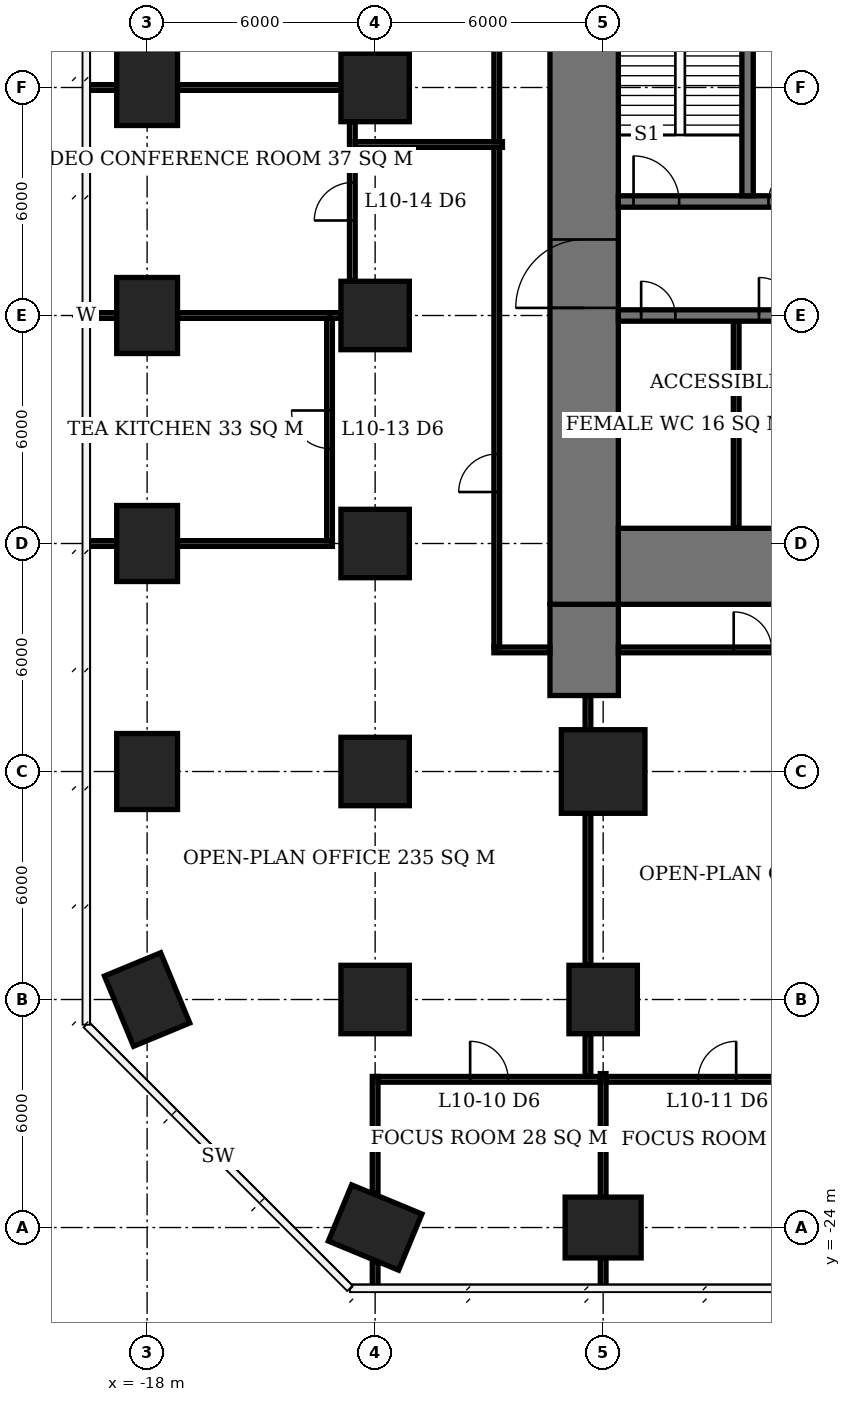
"""IFC4 building model, lengths in metres.
Left out: names, types, materials, properties, quantities, classifications, styles, units other than length and angle.
Written with IfcOpenShell. Run it as: python <this file> out.ifc"""

import sys

from ifc_helpers import new_model, si_unit, direction, frame, frame_2d, origin, origin_2d, place, context, subcontext, project, spatial, rectangle, extrude, element, fill, save


model = new_model("IFC4")
c1 = context("Model", 3, precision=1e-05, world=origin(), true_north=direction((0.0, 1.0)))
c2 = subcontext(c1, "Body", "Model", "MODEL_VIEW")
j1 = project(units=[si_unit("LENGTHUNIT", "METRE"), si_unit("PLANEANGLEUNIT", "RADIAN")], contexts=[c1])
p1 = place(None, origin())
s1 = spatial("IfcSite", under=j1, at=p1, CompositionType="ELEMENT")
p2 = place(p1, origin())
s2 = spatial("IfcBuilding", under=s1, at=p2, CompositionType="ELEMENT")
p3 = place(p2, frame((0.0, 0.0, 45.5)))
s3 = spatial("IfcBuildingStorey", under=s2, at=p3, CompositionType="ELEMENT", Elevation=45.5)
for number, where, z_axis, x_axis in (
    (1, (-18.0, -18.0, 0.0), (0.0, 0.0, 1.0), (-0.383, 0.924, 0.0)),
    (2, (-18.0, -12.0, 0.0), (0.0, 0.0, 1.0), (0.0, 1.0, 0.0)),
    (3, (-18.0, -6.0, 0.0), (0.0, 0.0, 1.0), (0.0, 1.0, 0.0)),
    (4, (-18.0, 0.0, 0.0), (0.0, 0.0, 1.0), (0.0, 1.0, 0.0)),
    (5, (-18.0, 6.0, 0.0), (0.0, 0.0, 1.0), (0.0, 1.0, 0.0)),
    (6, (-12.0, -24.0, 0.0), (0.0, 0.0, 1.0), (-0.924, 0.383, 0.0)),
):
    element("IfcColumn", number, at=place(p3, frame(where, z_axis=z_axis, x_axis=x_axis)), inside=s3, PredefinedType="COLUMN", context=c2, shape_type="SweptSolid", body=[
        extrude(rectangle(XDim=2.0, YDim=1.6, at=origin_2d()), origin(), (0.0, 0.0, 1.0), 3.9),
    ])
for number, where, z_axis, x_axis in (
    (7, (-12.0, -18.0, 0.0), (0.0, 0.0, 1.0), (1.0, 0.0, 0.0)),
    (8, (-12.0, -12.0, 0.0), (0.0, 0.0, 1.0), (1.0, 0.0, 0.0)),
    (9, (-12.0, -6.0, 0.0), (0.0, 0.0, 1.0), (1.0, 0.0, 0.0)),
    (10, (-12.0, 0.0, 0.0), (0.0, 0.0, 1.0), (1.0, 0.0, 0.0)),
    (11, (-12.0, 6.0, 0.0), (0.0, 0.0, 1.0), (1.0, 0.0, 0.0)),
):
    element("IfcColumn", number, at=place(p3, frame(where, z_axis=z_axis, x_axis=x_axis)), inside=s3, PredefinedType="COLUMN", context=c2, shape_type="SweptSolid", body=[
        extrude(rectangle(XDim=1.8, YDim=1.8, at=origin_2d()), origin(), (0.0, 0.0, 1.0), 3.9),
    ])
p4 = place(p3, frame((-6.0, -24.0, 0.0), z_axis=(0.0, 0.0, 1.0), x_axis=(1.0, 0.0, 0.0)))
e12 = element("IfcColumn", 12, at=p4, inside=s3, PredefinedType="COLUMN", context=c2, shape_type="SweptSolid", body=[
    extrude(rectangle(XDim=2.0, YDim=1.6, at=origin_2d()), origin(), (0.0, 0.0, 1.0), 3.9),
])
p5 = place(p3, frame((-6.0, -18.0, 0.0), z_axis=(0.0, 0.0, 1.0), x_axis=(1.0, 0.0, 0.0)))
e13 = element("IfcColumn", 13, at=p5, inside=s3, PredefinedType="COLUMN", context=c2, shape_type="SweptSolid", body=[
    extrude(rectangle(XDim=1.8, YDim=1.8, at=origin_2d()), origin(), (0.0, 0.0, 1.0), 3.9),
])
p6 = place(p3, frame((-6.0, -12.0, 0.0), z_axis=(0.0, 0.0, 1.0), x_axis=(1.0, 0.0, 0.0)))
e14 = element("IfcColumn", 14, at=p6, inside=s3, PredefinedType="COLUMN", context=c2, shape_type="SweptSolid", body=[
    extrude(rectangle(XDim=2.2, YDim=2.2, at=origin_2d()), origin(), (0.0, 0.0, 1.0), 3.9),
])
p7 = place(p3, frame((-5.6, -6.6, 0.0), z_axis=(0.0, 0.0, 1.0), x_axis=(1.0, 0.0, 0.0)))
e15 = element("IfcWall", 15, at=p7, inside=s3, PredefinedType="SHEAR", context=c2, shape_type="SweptSolid", body=[
    extrude(rectangle(XDim=23.2, YDim=2.0, at=frame_2d((11.6, 0.0))), origin(), (0.0, 0.0, 1.0), 3.9),
])
p8 = place(p3, frame((-6.5, -7.6, 0.0), z_axis=(0.0, 0.0, 1.0), x_axis=(0.0, 1.0, 0.0)))
e16 = element("IfcWall", 16, at=p8, inside=s3, PredefinedType="SHEAR", context=c2, shape_type="SweptSolid", body=[
    extrude(rectangle(XDim=21.2, YDim=1.8, at=frame_2d((10.6, 0.0))), origin(), (0.0, 0.0, 1.0), 3.9),
])
p9 = place(p8, frame((7.8, 0.0, 0.0)))
e17 = element("IfcOpeningElement", 17, at=p9, cuts=e16, PredefinedType="OPENING", context=c2, shape_type="SweptSolid", body=[
    extrude(rectangle(XDim=1.8, YDim=2.4, at=frame_2d((0.9, 1.2))), frame((0.0, 0.91, 0.0), z_axis=(0.0, -1.0, 0.0), x_axis=(1.0, 0.0, 0.0)), (0.0, 0.0, 1.0), 1.82),
])
p10 = place(p3, frame((-6.5, -10.0, 0.0), z_axis=(0.0, 0.0, 1.0), x_axis=(0.0, 1.0, 0.0)))
e18 = element("IfcWall", 18, at=p10, inside=s3, PredefinedType="SHEAR", context=c2, shape_type="SweptSolid", body=[
    extrude(rectangle(XDim=2.4, YDim=1.8, at=frame_2d((1.2, 0.0))), origin(), (0.0, 0.0, 1.0), 3.9),
])
p11 = place(p3, frame((-5.6, 0.0, 0.0), z_axis=(0.0, 0.0, 1.0), x_axis=(1.0, 0.0, 0.0)))
e19 = element("IfcWall", 19, at=p11, inside=s3, PredefinedType="SHEAR", context=c2, shape_type="SweptSolid", body=[
    extrude(rectangle(XDim=17.75, YDim=0.3, at=frame_2d((8.875, 0.0))), origin(), (0.0, 0.0, 1.0), 3.9),
])
p12 = place(p11, frame((0.6, 0.0, 0.0)))
e20 = element("IfcOpeningElement", 20, at=p12, cuts=e19, PredefinedType="OPENING", context=c2, shape_type="SweptSolid", body=[
    extrude(rectangle(XDim=0.9, YDim=2.1, at=frame_2d((0.45, 1.05))), frame((0.0, 0.16, 0.0), z_axis=(0.0, -1.0, 0.0), x_axis=(1.0, 0.0, 0.0)), (0.0, 0.0, 1.0), 0.32),
])
p13 = place(p11, frame((3.7, 0.0, 0.0)))
e21 = element("IfcOpeningElement", 21, at=p13, cuts=e19, PredefinedType="OPENING", context=c2, shape_type="SweptSolid", body=[
    extrude(rectangle(XDim=1.0, YDim=2.1, at=frame_2d((0.5, 1.05))), frame((0.0, 0.16, 0.0), z_axis=(0.0, -1.0, 0.0), x_axis=(1.0, 0.0, 0.0)), (0.0, 0.0, 1.0), 0.32),
])
p14 = place(p3, frame((-5.6, 3.0, 0.0), z_axis=(0.0, 0.0, 1.0), x_axis=(1.0, 0.0, 0.0)))
e22 = element("IfcWall", 22, at=p14, inside=s3, PredefinedType="SHEAR", context=c2, shape_type="SweptSolid", body=[
    extrude(rectangle(XDim=5.45, YDim=0.3, at=frame_2d((2.725, 0.0))), origin(), (0.0, 0.0, 1.0), 3.9),
])
p15 = place(p14, frame((0.4, 0.0, 0.0)))
e23 = element("IfcOpeningElement", 23, at=p15, cuts=e22, PredefinedType="OPENING", context=c2, shape_type="SweptSolid", body=[
    extrude(rectangle(XDim=1.2, YDim=2.1, at=frame_2d((0.6, 1.05))), frame((0.0, 0.16, 0.0), z_axis=(0.0, -1.0, 0.0), x_axis=(1.0, 0.0, 0.0)), (0.0, 0.0, 1.0), 0.32),
])
p16 = place(p14, frame((3.95, 0.0, 0.0)))
e24 = element("IfcOpeningElement", 24, at=p16, cuts=e22, PredefinedType="OPENING", context=c2, shape_type="SweptSolid", body=[
    extrude(rectangle(XDim=0.9, YDim=2.1, at=frame_2d((0.45, 1.05))), frame((0.0, 0.16, 0.0), z_axis=(0.0, -1.0, 0.0), x_axis=(1.0, 0.0, 0.0)), (0.0, 0.0, 1.0), 0.32),
])
p17 = place(p3, frame((-2.2, 3.15, 0.0), z_axis=(0.0, 0.0, 1.0), x_axis=(0.0, 1.0, 0.0)))
e25 = element("IfcWall", 25, at=p17, inside=s3, PredefinedType="SHEAR", context=c2, shape_type="SweptSolid", body=[
    extrude(rectangle(XDim=8.45, YDim=0.3, at=frame_2d((4.225, 0.0))), origin(), (0.0, 0.0, 1.0), 3.9),
])
p18 = place(p3, frame((-2.5, -5.6, 0.0), z_axis=(0.0, 0.0, 1.0), x_axis=(0.0, 1.0, 0.0)))
e26 = element("IfcWall", 26, at=p18, inside=s3, PredefinedType="PLUMBINGWALL", context=c2, shape_type="SweptSolid", body=[
    extrude(rectangle(XDim=5.45, YDim=0.15, at=frame_2d((2.725, 0.0))), origin(), (0.0, 0.0, 1.0), 3.65),
])
p19 = place(p3, frame((-11.925, -20.1, 0.0), z_axis=(0.0, 0.0, 1.0), x_axis=(1.0, 0.0, 0.0)))
e27 = element("IfcWall", 27, at=p19, inside=s3, PredefinedType="PARTITIONING", context=c2, shape_type="SweptSolid", body=[
    extrude(rectangle(XDim=5.85, YDim=0.15, at=frame_2d((2.925, 0.0))), origin(), (0.0, 0.0, 1.0), 3.65),
])
p20 = place(p19, frame((2.425, 0.0, 0.0)))
e28 = element("IfcOpeningElement", 28, at=p20, cuts=e27, PredefinedType="OPENING", context=c2, shape_type="SweptSolid", body=[
    extrude(rectangle(XDim=1.0, YDim=2.1, at=frame_2d((0.5, 1.05))), frame((0.0, 0.085, 0.0), z_axis=(0.0, -1.0, 0.0), x_axis=(1.0, 0.0, 0.0)), (0.0, 0.0, 1.0), 0.17),
])
p21 = place(p3, frame((-5.925, -20.1, 0.0), z_axis=(0.0, 0.0, 1.0), x_axis=(1.0, 0.0, 0.0)))
e29 = element("IfcWall", 29, at=p21, inside=s3, PredefinedType="PARTITIONING", context=c2, shape_type="SweptSolid", body=[
    extrude(rectangle(XDim=5.85, YDim=0.15, at=frame_2d((2.925, 0.0))), origin(), (0.0, 0.0, 1.0), 3.65),
])
p22 = place(p21, frame((2.425, 0.0, 0.0)))
e30 = element("IfcOpeningElement", 30, at=p22, cuts=e29, PredefinedType="OPENING", context=c2, shape_type="SweptSolid", body=[
    extrude(rectangle(XDim=1.0, YDim=2.1, at=frame_2d((0.5, 1.05))), frame((0.0, 0.085, 0.0), z_axis=(0.0, -1.0, 0.0), x_axis=(1.0, 0.0, 0.0)), (0.0, 0.0, 1.0), 0.17),
])
p23 = place(p3, frame((-19.6, -6.0, 0.0), z_axis=(0.0, 0.0, 1.0), x_axis=(1.0, 0.0, 0.0)))
e31 = element("IfcWall", 31, at=p23, inside=s3, PredefinedType="PARTITIONING", context=c2, shape_type="SweptSolid", body=[
    extrude(rectangle(XDim=0.8, YDim=0.15, at=frame_2d((0.4, 0.0))), origin(), (0.0, 0.0, 1.0), 3.65),
])
p24 = place(p3, frame((-17.2, -6.0, 0.0), z_axis=(0.0, 0.0, 1.0), x_axis=(1.0, 0.0, 0.0)))
e32 = element("IfcWall", 32, at=p24, inside=s3, PredefinedType="PARTITIONING", context=c2, shape_type="SweptSolid", body=[
    extrude(rectangle(XDim=4.075, YDim=0.15, at=frame_2d((2.038, 0.0))), origin(), (0.0, 0.0, 1.0), 3.65),
])
p25 = place(p3, frame((-19.55, 0.0, 0.0), z_axis=(0.0, 0.0, 1.0), x_axis=(1.0, 0.0, 0.0)))
e33 = element("IfcWall", 33, at=p25, inside=s3, PredefinedType="PARTITIONING", context=c2, shape_type="SweptSolid", body=[
    extrude(rectangle(XDim=0.75, YDim=0.15, at=frame_2d((0.375, 0.0))), origin(), (0.0, 0.0, 1.0), 3.65),
])
p26 = place(p3, frame((-17.2, 0.0, 0.0), z_axis=(0.0, 0.0, 1.0), x_axis=(1.0, 0.0, 0.0)))
e34 = element("IfcWall", 34, at=p26, inside=s3, PredefinedType="PARTITIONING", context=c2, shape_type="SweptSolid", body=[
    extrude(rectangle(XDim=4.075, YDim=0.15, at=frame_2d((2.038, 0.0))), origin(), (0.0, 0.0, 1.0), 3.65),
])
p27 = place(p3, frame((-13.2, 0.0, 0.0), z_axis=(0.0, 0.0, 1.0), x_axis=(1.0, 0.0, 0.0)))
e35 = element("IfcWall", 35, at=p27, inside=s3, PredefinedType="PARTITIONING", context=c2, shape_type="SweptSolid", body=[
    extrude(rectangle(XDim=0.3, YDim=0.15, at=frame_2d((0.15, 0.0))), origin(), (0.0, 0.0, 1.0), 3.65),
])
p28 = place(p3, frame((-19.6, 6.0, 0.0), z_axis=(0.0, 0.0, 1.0), x_axis=(1.0, 0.0, 0.0)))
e36 = element("IfcWall", 36, at=p28, inside=s3, PredefinedType="PARTITIONING", context=c2, shape_type="SweptSolid", body=[
    extrude(rectangle(XDim=0.8, YDim=0.15, at=frame_2d((0.4, 0.0))), origin(), (0.0, 0.0, 1.0), 3.65),
])
p29 = place(p3, frame((-17.2, 6.0, 0.0), z_axis=(0.0, 0.0, 1.0), x_axis=(1.0, 0.0, 0.0)))
e37 = element("IfcWall", 37, at=p29, inside=s3, PredefinedType="PARTITIONING", context=c2, shape_type="SweptSolid", body=[
    extrude(rectangle(XDim=4.3, YDim=0.15, at=frame_2d((2.15, 0.0))), origin(), (0.0, 0.0, 1.0), 3.65),
])
p30 = place(p3, frame((-13.2, -5.925, 0.0), z_axis=(0.0, 0.0, 1.0), x_axis=(0.0, 1.0, 0.0)))
e38 = element("IfcWall", 38, at=p30, inside=s3, PredefinedType="PARTITIONING", context=c2, shape_type="SweptSolid", body=[
    extrude(rectangle(XDim=5.85, YDim=0.15, at=frame_2d((2.925, 0.0))), origin(), (0.0, 0.0, 1.0), 3.65),
])
p31 = place(p30, frame((2.425, 0.0, 0.0)))
e39 = element("IfcOpeningElement", 39, at=p31, cuts=e38, PredefinedType="OPENING", context=c2, shape_type="SweptSolid", body=[
    extrude(rectangle(XDim=1.0, YDim=2.1, at=frame_2d((0.5, 1.05))), frame((0.0, 0.085, 0.0), z_axis=(0.0, -1.0, 0.0), x_axis=(1.0, 0.0, 0.0)), (0.0, 0.0, 1.0), 0.17),
])
p32 = place(p3, frame((-12.6, 0.9, 0.0), z_axis=(0.0, 0.0, 1.0), x_axis=(0.0, 1.0, 0.0)))
e40 = element("IfcWall", 40, at=p32, inside=s3, PredefinedType="PARTITIONING", context=c2, shape_type="SweptSolid", body=[
    extrude(rectangle(XDim=4.2, YDim=0.15, at=frame_2d((2.1, 0.0))), origin(), (0.0, 0.0, 1.0), 3.65),
])
p33 = place(p32, frame((1.6, 0.0, 0.0)))
e41 = element("IfcOpeningElement", 41, at=p33, cuts=e40, PredefinedType="OPENING", context=c2, shape_type="SweptSolid", body=[
    extrude(rectangle(XDim=1.0, YDim=2.1, at=frame_2d((0.5, 1.05))), frame((0.0, 0.085, 0.0), z_axis=(0.0, -1.0, 0.0), x_axis=(1.0, 0.0, 0.0)), (0.0, 0.0, 1.0), 0.17),
])
p34 = place(p3, frame((-12.0, -25.6, 0.0), z_axis=(0.0, 0.0, 1.0), x_axis=(0.0, 1.0, 0.0)))
e42 = element("IfcWall", 42, at=p34, inside=s3, PredefinedType="PARTITIONING", context=c2, shape_type="SweptSolid", body=[
    extrude(rectangle(XDim=0.703, YDim=0.15, at=frame_2d((0.352, 0.0))), origin(), (0.0, 0.0, 1.0), 3.65),
])
p35 = place(p3, frame((-12.0, -23.103, 0.0), z_axis=(0.0, 0.0, 1.0), x_axis=(0.0, 1.0, 0.0)))
e43 = element("IfcWall", 43, at=p35, inside=s3, PredefinedType="PARTITIONING", context=c2, shape_type="SweptSolid", body=[
    extrude(rectangle(XDim=3.078, YDim=0.15, at=frame_2d((1.539, 0.0))), origin(), (0.0, 0.0, 1.0), 3.65),
])
p36 = place(p3, frame((-6.0, -25.6, 0.0), z_axis=(0.0, 0.0, 1.0), x_axis=(0.0, 1.0, 0.0)))
e44 = element("IfcWall", 44, at=p36, inside=s3, PredefinedType="PARTITIONING", context=c2, shape_type="SweptSolid", body=[
    extrude(rectangle(XDim=0.8, YDim=0.15, at=frame_2d((0.4, 0.0))), origin(), (0.0, 0.0, 1.0), 3.65),
])
p37 = place(p3, frame((-6.0, -23.2, 0.0), z_axis=(0.0, 0.0, 1.0), x_axis=(0.0, 1.0, 0.0)))
e45 = element("IfcWall", 45, at=p37, inside=s3, PredefinedType="PARTITIONING", context=c2, shape_type="SweptSolid", body=[
    extrude(rectangle(XDim=3.25, YDim=0.15, at=frame_2d((1.625, 0.0))), origin(), (0.0, 0.0, 1.0), 3.65),
])
p38 = place(p3, frame((-12.525, 4.5, 0.0), z_axis=(0.0, 0.0, 1.0), x_axis=(1.0, 0.0, 0.0)))
e46 = element("IfcWall", 46, at=p38, inside=s3, PredefinedType="PARTITIONING", context=c2, shape_type="SweptSolid", body=[
    extrude(rectangle(XDim=3.875, YDim=0.15, at=frame_2d((1.938, 0.0))), origin(), (0.0, 0.0, 1.0), 3.65),
])
p39 = place(p3, frame((-8.8, -8.725, 0.0), z_axis=(0.0, 0.0, 1.0), x_axis=(0.0, 1.0, 0.0)))
e47 = element("IfcWall", 47, at=p39, inside=s3, PredefinedType="PARTITIONING", context=c2, shape_type="SweptSolid", body=[
    extrude(rectangle(XDim=13.15, YDim=0.15, at=frame_2d((6.575, 0.0))), origin(), (0.0, 0.0, 1.0), 3.65),
])
p40 = place(p39, frame((4.08, 0.0, 0.0)))
e48 = element("IfcOpeningElement", 48, at=p40, cuts=e47, PredefinedType="OPENING", context=c2, shape_type="SweptSolid", body=[
    extrude(rectangle(XDim=1.0, YDim=2.1, at=frame_2d((0.5, 1.05))), frame((0.0, 0.085, 0.0), z_axis=(0.0, -1.0, 0.0), x_axis=(1.0, 0.0, 0.0)), (0.0, 0.0, 1.0), 0.17),
])
p41 = place(p3, frame((-8.875, -8.8, 0.0), z_axis=(0.0, 0.0, 1.0), x_axis=(1.0, 0.0, 0.0)))
e49 = element("IfcWall", 49, at=p41, inside=s3, PredefinedType="PARTITIONING", context=c2, shape_type="SweptSolid", body=[
    extrude(rectangle(XDim=1.475, YDim=0.15, at=frame_2d((0.738, 0.0))), origin(), (0.0, 0.0, 1.0), 3.65),
])
p42 = place(p3, frame((-8.8, 4.575, 0.0), z_axis=(0.0, 0.0, 1.0), x_axis=(0.0, 1.0, 0.0)))
e50 = element("IfcWall", 50, at=p42, inside=s3, PredefinedType="PARTITIONING", context=c2, shape_type="SweptSolid", body=[
    extrude(rectangle(XDim=10.15, YDim=0.15, at=frame_2d((5.075, 0.0))), origin(), (0.0, 0.0, 1.0), 3.65),
])
p43 = place(p42, frame((6.12, 0.0, 0.0)))
e51 = element("IfcOpeningElement", 51, at=p43, cuts=e50, PredefinedType="OPENING", context=c2, shape_type="SweptSolid", body=[
    extrude(rectangle(XDim=1.0, YDim=2.1, at=frame_2d((0.5, 1.05))), frame((0.0, 0.085, 0.0), z_axis=(0.0, -1.0, 0.0), x_axis=(1.0, 0.0, 0.0)), (0.0, 0.0, 1.0), 0.17),
])
p44 = place(p3, frame((-6.4, -20.025, 0.0), z_axis=(0.0, 0.0, 1.0), x_axis=(0.0, 1.0, 0.0)))
e52 = element("IfcWall", 52, at=p44, inside=s3, PredefinedType="PARTITIONING", context=c2, shape_type="SweptSolid", body=[
    extrude(rectangle(XDim=1.125, YDim=0.15, at=frame_2d((0.562, 0.0))), origin(), (0.0, 0.0, 1.0), 3.65),
])
p45 = place(p3, frame((-6.4, -17.1, 0.0), z_axis=(0.0, 0.0, 1.0), x_axis=(0.0, 1.0, 0.0)))
e53 = element("IfcWall", 53, at=p45, inside=s3, PredefinedType="PARTITIONING", context=c2, shape_type="SweptSolid", body=[
    extrude(rectangle(XDim=4.0, YDim=0.15, at=frame_2d((2.0, 0.0))), origin(), (0.0, 0.0, 1.0), 3.65),
])
p46 = place(p3, frame((-6.4, -10.9, 0.0), z_axis=(0.0, 0.0, 1.0), x_axis=(0.0, 1.0, 0.0)))
e54 = element("IfcWall", 54, at=p46, inside=s3, PredefinedType="PARTITIONING", context=c2, shape_type="SweptSolid", body=[
    extrude(rectangle(XDim=0.9, YDim=0.15, at=frame_2d((0.45, 0.0))), origin(), (0.0, 0.0, 1.0), 3.65),
])
p47 = place(p3, frame((-5.6, -8.8, 0.0), z_axis=(0.0, 0.0, 1.0), x_axis=(1.0, 0.0, 0.0)))
e55 = element("IfcWall", 55, at=p47, inside=s3, PredefinedType="PARTITIONING", context=c2, shape_type="SweptSolid", body=[
    extrude(rectangle(XDim=10.025, YDim=0.15, at=frame_2d((5.013, 0.0))), origin(), (0.0, 0.0, 1.0), 3.65),
])
p48 = place(p47, frame((3.035, 0.0, 0.0)))
e56 = element("IfcOpeningElement", 56, at=p48, cuts=e55, PredefinedType="OPENING", context=c2, shape_type="SweptSolid", body=[
    extrude(rectangle(XDim=1.0, YDim=2.1, at=frame_2d((0.5, 1.05))), frame((0.0, 0.085, 0.0), z_axis=(0.0, -1.0, 0.0), x_axis=(1.0, 0.0, 0.0)), (0.0, 0.0, 1.0), 0.17),
])
p49 = place(p9, origin())
e57 = element("IfcDoor", 57, at=p49, inside=s3, OperationType="DOUBLE_DOOR_SINGLE_SWING", PredefinedType="DOOR", context=c2, shape_type="SweptSolid", body=[
    extrude(rectangle(XDim=1.8, YDim=2.4, at=frame_2d((0.9, 1.2))), frame((0.0, 0.025, 0.0), z_axis=(0.0, -1.0, 0.0), x_axis=(1.0, 0.0, 0.0)), (0.0, 0.0, 1.0), 0.05),
])
fill(e17, e57)
p50 = place(p15, origin())
e58 = element("IfcDoor", 58, at=p50, inside=s3, OperationType="SINGLE_SWING_LEFT", PredefinedType="DOOR", context=c2, shape_type="SweptSolid", body=[
    extrude(rectangle(XDim=1.2, YDim=2.1, at=frame_2d((0.6, 1.05))), frame((0.0, 0.025, 0.0), z_axis=(0.0, -1.0, 0.0), x_axis=(1.0, 0.0, 0.0)), (0.0, 0.0, 1.0), 0.05),
])
fill(e23, e58)
p51 = place(p16, origin())
e59 = element("IfcDoor", 59, at=p51, inside=s3, OperationType="SINGLE_SWING_RIGHT", PredefinedType="DOOR", context=c2, shape_type="SweptSolid", body=[
    extrude(rectangle(XDim=0.9, YDim=2.1, at=frame_2d((0.45, 1.05))), frame((0.0, 0.025, 0.0), z_axis=(0.0, -1.0, 0.0), x_axis=(1.0, 0.0, 0.0)), (0.0, 0.0, 1.0), 0.05),
])
fill(e24, e59)
p52 = place(p12, origin())
e60 = element("IfcDoor", 60, at=p52, inside=s3, OperationType="SINGLE_SWING_LEFT", PredefinedType="DOOR", context=c2, shape_type="SweptSolid", body=[
    extrude(rectangle(XDim=0.9, YDim=2.1, at=frame_2d((0.45, 1.05))), frame((0.0, 0.025, 0.0), z_axis=(0.0, -1.0, 0.0), x_axis=(1.0, 0.0, 0.0)), (0.0, 0.0, 1.0), 0.05),
])
fill(e20, e60)
p53 = place(p13, origin())
e61 = element("IfcDoor", 61, at=p53, inside=s3, OperationType="SINGLE_SWING_LEFT", PredefinedType="DOOR", context=c2, shape_type="SweptSolid", body=[
    extrude(rectangle(XDim=1.0, YDim=2.1, at=frame_2d((0.5, 1.05))), frame((0.0, 0.025, 0.0), z_axis=(0.0, -1.0, 0.0), x_axis=(1.0, 0.0, 0.0)), (0.0, 0.0, 1.0), 0.05),
])
fill(e21, e61)
p54 = place(p20, origin())
e62 = element("IfcDoor", 62, at=p54, inside=s3, OperationType="SINGLE_SWING_LEFT", PredefinedType="DOOR", context=c2, shape_type="SweptSolid", body=[
    extrude(rectangle(XDim=1.0, YDim=2.1, at=frame_2d((0.5, 1.05))), frame((0.0, 0.025, 0.0), z_axis=(0.0, -1.0, 0.0), x_axis=(1.0, 0.0, 0.0)), (0.0, 0.0, 1.0), 0.05),
])
fill(e28, e62)
p55 = place(p22, origin())
e63 = element("IfcDoor", 63, at=p55, inside=s3, OperationType="SINGLE_SWING_RIGHT", PredefinedType="DOOR", context=c2, shape_type="SweptSolid", body=[
    extrude(rectangle(XDim=1.0, YDim=2.1, at=frame_2d((0.5, 1.05))), frame((0.0, 0.025, 0.0), z_axis=(0.0, -1.0, 0.0), x_axis=(1.0, 0.0, 0.0)), (0.0, 0.0, 1.0), 0.05),
])
fill(e30, e63)
p56 = place(p31, origin())
e64 = element("IfcDoor", 64, at=p56, inside=s3, OperationType="SINGLE_SWING_RIGHT", PredefinedType="DOOR", context=c2, shape_type="SweptSolid", body=[
    extrude(rectangle(XDim=1.0, YDim=2.1, at=frame_2d((0.5, 1.05))), frame((0.0, 0.025, 0.0), z_axis=(0.0, -1.0, 0.0), x_axis=(1.0, 0.0, 0.0)), (0.0, 0.0, 1.0), 0.05),
])
fill(e39, e64)
p57 = place(p33, origin())
e65 = element("IfcDoor", 65, at=p57, inside=s3, OperationType="SINGLE_SWING_LEFT", PredefinedType="DOOR", context=c2, shape_type="SweptSolid", body=[
    extrude(rectangle(XDim=1.0, YDim=2.1, at=frame_2d((0.5, 1.05))), frame((0.0, 0.025, 0.0), z_axis=(0.0, -1.0, 0.0), x_axis=(1.0, 0.0, 0.0)), (0.0, 0.0, 1.0), 0.05),
])
fill(e41, e65)
p58 = place(p48, origin())
e66 = element("IfcDoor", 66, at=p58, inside=s3, OperationType="SINGLE_SWING_LEFT", PredefinedType="DOOR", context=c2, shape_type="SweptSolid", body=[
    extrude(rectangle(XDim=1.0, YDim=2.1, at=frame_2d((0.5, 1.05))), frame((0.0, 0.025, 0.0), z_axis=(0.0, -1.0, 0.0), x_axis=(1.0, 0.0, 0.0)), (0.0, 0.0, 1.0), 0.05),
])
fill(e56, e66)
p59 = place(p40, origin())
e67 = element("IfcDoor", 67, at=p59, inside=s3, OperationType="SINGLE_SWING_LEFT", PredefinedType="DOOR", context=c2, shape_type="SweptSolid", body=[
    extrude(rectangle(XDim=1.0, YDim=2.1, at=frame_2d((0.5, 1.05))), frame((0.0, 0.025, 0.0), z_axis=(0.0, -1.0, 0.0), x_axis=(1.0, 0.0, 0.0)), (0.0, 0.0, 1.0), 0.05),
])
fill(e48, e67)
save(model, sys.argv[1])
